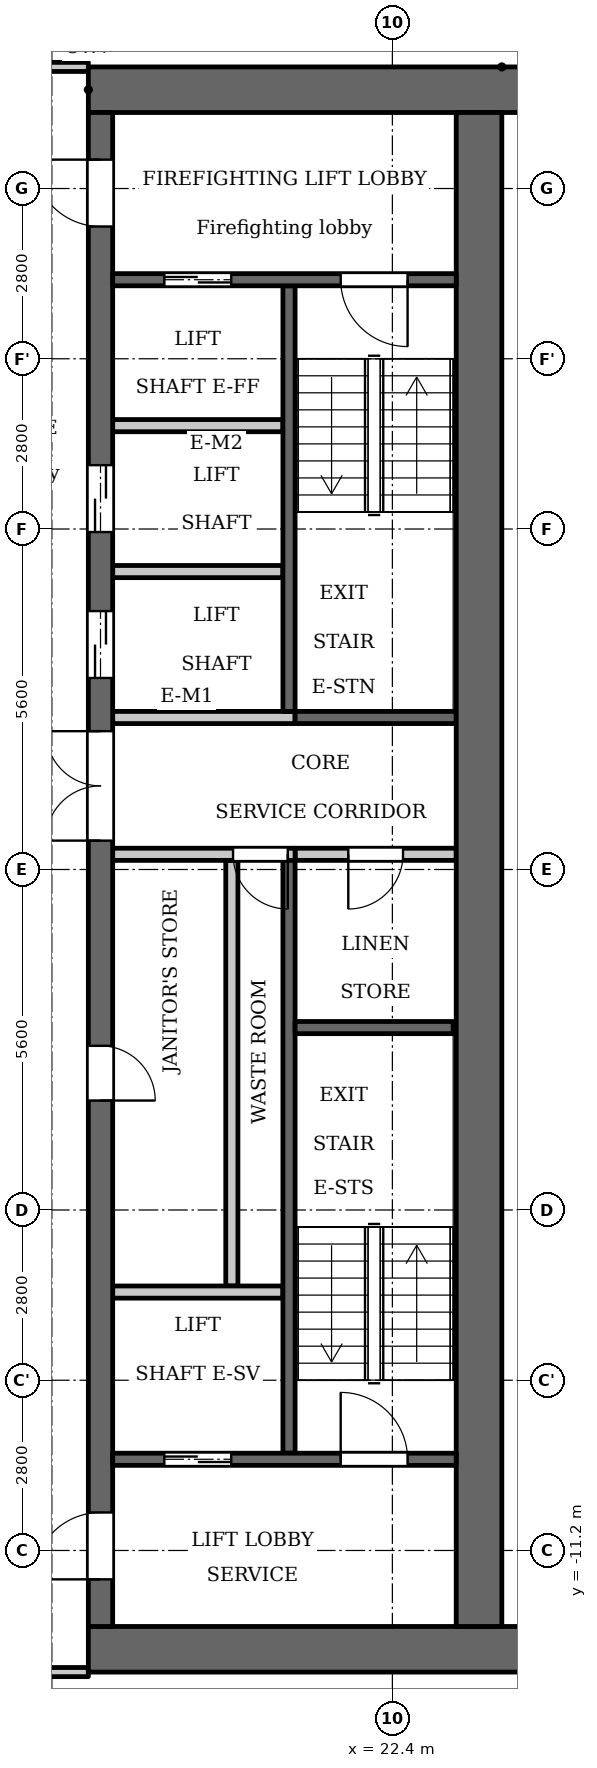
"""IFC4 building model, lengths in metres.
Left out: names, types, materials, properties, quantities, classifications, styles, units other than length and angle.
Written with IfcOpenShell. Run it as: python <this file> out.ifc"""

import sys

from ifc_helpers import new_model, si_unit, direction, frame, frame_2d, origin, place, context, subcontext, project, spatial, rectangle, extrude, element, fill, save


model = new_model("IFC4")
c1 = context("Model", 3, precision=1e-05, world=origin(), true_north=direction((0.0, 1.0)))
c2 = subcontext(c1, "Body", "Model", "MODEL_VIEW")
j1 = project(units=[si_unit("LENGTHUNIT", "METRE"), si_unit("PLANEANGLEUNIT", "RADIAN")], contexts=[c1])
p1 = place(None, origin())
s1 = spatial("IfcSite", under=j1, at=p1, CompositionType="ELEMENT")
p2 = place(p1, origin())
s2 = spatial("IfcBuilding", under=s1, at=p2, CompositionType="ELEMENT")
p3 = place(p2, frame((0.0, 0.0, 213.4)))
s3 = spatial("IfcBuildingStorey", under=s2, at=p3, CompositionType="ELEMENT", Elevation=213.4)
p4 = place(p3, frame((20.7, 2.6, 0.0), z_axis=(0.0, 0.0, 1.0), x_axis=(0.0, 1.0, 0.0)))
e1 = element("IfcWall", 1, at=p4, inside=s3, PredefinedType="SHEAR", context=c2, shape_type="SweptSolid", body=[
    extrude(rectangle(XDim=7.0, YDim=0.2, at=frame_2d((3.5, 0.0))), origin(), (0.0, 0.0, 1.0), 3.2),
])
p5 = place(p3, frame((20.7, -9.6, 0.0), z_axis=(0.0, 0.0, 1.0), x_axis=(0.0, 1.0, 0.0)))
e2 = element("IfcWall", 2, at=p5, inside=s3, PredefinedType="SHEAR", context=c2, shape_type="SweptSolid", body=[
    extrude(rectangle(XDim=9.75, YDim=0.2, at=frame_2d((4.875, 0.0))), origin(), (0.0, 0.0, 1.0), 3.2),
])
p6 = place(p3, frame((20.8, 2.5, 0.0), z_axis=(0.0, 0.0, 1.0), x_axis=(1.0, 0.0, 0.0)))
e3 = element("IfcWall", 3, at=p6, inside=s3, PredefinedType="SHEAR", context=c2, shape_type="SweptSolid", body=[
    extrude(rectangle(XDim=2.65, YDim=0.2, at=frame_2d((1.325, 0.0))), origin(), (0.0, 0.0, 1.0), 3.2),
])
p7 = place(p3, frame((20.8, 0.25, 0.0), z_axis=(0.0, 0.0, 1.0), x_axis=(1.0, 0.0, 0.0)))
e4 = element("IfcWall", 4, at=p7, inside=s3, PredefinedType="PARTITIONING", context=c2, shape_type="SweptSolid", body=[
    extrude(rectangle(XDim=2.65, YDim=0.2, at=frame_2d((1.325, 0.0))), origin(), (0.0, 0.0, 1.0), 3.2),
])
p8 = place(p7, frame((0.875, 0.0, 0.0)))
e5 = element("IfcOpeningElement", 5, at=p8, cuts=e4, PredefinedType="OPENING", context=c2, shape_type="SweptSolid", body=[
    extrude(rectangle(XDim=0.9, YDim=2.1, at=frame_2d((0.45, 1.05))), frame((0.0, 0.11, 0.0), z_axis=(0.0, -1.0, 0.0), x_axis=(1.0, 0.0, 0.0)), (0.0, 0.0, 1.0), 0.22),
])
for number, where, z_axis, x_axis in (
    (6, (17.4, 12.825, 0.0), (0.0, 0.0, 1.0), (1.0, 0.0, 0.0)),
    (7, (17.4, -12.825, 0.0), (0.0, 0.0, 1.0), (1.0, 0.0, 0.0)),
):
    element("IfcWall", number, at=place(p3, frame(where, z_axis=z_axis, x_axis=x_axis)), inside=s3, PredefinedType="SHEAR", context=c2, shape_type="SweptSolid", body=[
        extrude(rectangle(XDim=7.6, YDim=0.75, at=frame_2d((3.8, 0.0))), origin(), (0.0, 0.0, 1.0), 3.2),
    ])
p9 = place(p3, frame((19.76, -6.85, 0.0), z_axis=(0.0, 0.0, 1.0), x_axis=(0.0, 1.0, 0.0)))
e8 = element("IfcWall", 8, at=p9, inside=s3, PredefinedType="PARTITIONING", context=c2, shape_type="SweptSolid", body=[
    extrude(rectangle(XDim=7.0, YDim=0.2, at=frame_2d((3.5, 0.0))), origin(), (0.0, 0.0, 1.0), 3.2),
])
p10 = place(p3, frame((17.6, -12.45, 0.0), z_axis=(0.0, 0.0, 1.0), x_axis=(0.0, 1.0, 0.0)))
e9 = element("IfcWall", 9, at=p10, inside=s3, PredefinedType="SHEAR", context=c2, shape_type="SweptSolid", body=[
    extrude(rectangle(XDim=24.9, YDim=0.4, at=frame_2d((12.45, 0.0))), origin(), (0.0, 0.0, 1.0), 3.2),
])
p11 = place(p10, frame((8.65, 0.0, 0.0)))
e10 = element("IfcOpeningElement", 10, at=p11, cuts=e9, PredefinedType="OPENING", context=c2, shape_type="SweptSolid", body=[
    extrude(rectangle(XDim=0.9, YDim=2.1, at=frame_2d((0.45, 1.05))), frame((0.0, 0.21, 0.0), z_axis=(0.0, -1.0, 0.0), x_axis=(1.0, 0.0, 0.0)), (0.0, 0.0, 1.0), 0.42),
])
p12 = place(p10, frame((15.6, 0.0, 0.0)))
e11 = element("IfcOpeningElement", 11, at=p12, cuts=e9, PredefinedType="OPENING", context=c2, shape_type="SweptSolid", body=[
    extrude(rectangle(XDim=1.1, YDim=2.1, at=frame_2d((0.55, 1.05))), frame((0.0, 0.21, 0.0), z_axis=(0.0, -1.0, 0.0), x_axis=(1.0, 0.0, 0.0)), (0.0, 0.0, 1.0), 0.42),
])
p13 = place(p10, frame((18.0, 0.0, 0.0)))
e12 = element("IfcOpeningElement", 12, at=p13, cuts=e9, PredefinedType="OPENING", context=c2, shape_type="SweptSolid", body=[
    extrude(rectangle(XDim=1.1, YDim=2.1, at=frame_2d((0.55, 1.05))), frame((0.0, 0.21, 0.0), z_axis=(0.0, -1.0, 0.0), x_axis=(1.0, 0.0, 0.0)), (0.0, 0.0, 1.0), 0.42),
])
p14 = place(p10, frame((23.025, 0.0, 0.0)))
e13 = element("IfcOpeningElement", 13, at=p14, cuts=e9, PredefinedType="OPENING", context=c2, shape_type="SweptSolid", body=[
    extrude(rectangle(XDim=1.1, YDim=2.1, at=frame_2d((0.55, 1.05))), frame((0.0, 0.21, 0.0), z_axis=(0.0, -1.0, 0.0), x_axis=(1.0, 0.0, 0.0)), (0.0, 0.0, 1.0), 0.42),
])
p15 = place(p10, frame((0.775, 0.0, 0.0)))
e14 = element("IfcOpeningElement", 14, at=p15, cuts=e9, PredefinedType="OPENING", context=c2, shape_type="SweptSolid", body=[
    extrude(rectangle(XDim=1.1, YDim=2.1, at=frame_2d((0.55, 1.05))), frame((0.0, 0.21, 0.0), z_axis=(0.0, -1.0, 0.0), x_axis=(1.0, 0.0, 0.0)), (0.0, 0.0, 1.0), 0.42),
])
p16 = place(p10, frame((12.925, 0.0, 0.0)))
e15 = element("IfcOpeningElement", 15, at=p16, cuts=e9, PredefinedType="OPENING", context=c2, shape_type="SweptSolid", body=[
    extrude(rectangle(XDim=1.8, YDim=2.1, at=frame_2d((0.9, 1.05))), frame((0.0, 0.21, 0.0), z_axis=(0.0, -1.0, 0.0), x_axis=(1.0, 0.0, 0.0)), (0.0, 0.0, 1.0), 0.42),
])
p17 = place(p3, frame((23.825, -12.45, 0.0), z_axis=(0.0, 0.0, 1.0), x_axis=(0.0, 1.0, 0.0)))
e16 = element("IfcWall", 16, at=p17, inside=s3, PredefinedType="SHEAR", context=c2, shape_type="SweptSolid", body=[
    extrude(rectangle(XDim=24.9, YDim=0.75, at=frame_2d((12.45, 0.0))), origin(), (0.0, 0.0, 1.0), 3.2),
])
p18 = place(p3, frame((17.8, -9.7, 0.0), z_axis=(0.0, 0.0, 1.0), x_axis=(1.0, 0.0, 0.0)))
e17 = element("IfcWall", 17, at=p18, inside=s3, PredefinedType="SHEAR", context=c2, shape_type="SweptSolid", body=[
    extrude(rectangle(XDim=5.65, YDim=0.2, at=frame_2d((2.825, 0.0))), origin(), (0.0, 0.0, 1.0), 3.2),
])
p19 = place(p18, frame((0.85, 0.0, 0.0)))
e18 = element("IfcOpeningElement", 18, at=p19, cuts=e17, PredefinedType="OPENING", context=c2, shape_type="SweptSolid", body=[
    extrude(rectangle(XDim=1.1, YDim=2.1, at=frame_2d((0.55, 1.05))), frame((0.0, 0.11, 0.0), z_axis=(0.0, -1.0, 0.0), x_axis=(1.0, 0.0, 0.0)), (0.0, 0.0, 1.0), 0.22),
])
p20 = place(p18, frame((3.75, 0.0, 0.0)))
e19 = element("IfcOpeningElement", 19, at=p20, cuts=e17, PredefinedType="OPENING", context=c2, shape_type="SweptSolid", body=[
    extrude(rectangle(XDim=1.1, YDim=2.1, at=frame_2d((0.55, 1.05))), frame((0.0, 0.11, 0.0), z_axis=(0.0, -1.0, 0.0), x_axis=(1.0, 0.0, 0.0)), (0.0, 0.0, 1.0), 0.22),
])
p21 = place(p3, frame((17.8, -6.95, 0.0), z_axis=(0.0, 0.0, 1.0), x_axis=(1.0, 0.0, 0.0)))
e20 = element("IfcWall", 20, at=p21, inside=s3, PredefinedType="PARTITIONING", context=c2, shape_type="SweptSolid", body=[
    extrude(rectangle(XDim=2.8, YDim=0.2, at=frame_2d((1.4, 0.0))), origin(), (0.0, 0.0, 1.0), 3.2),
])
p22 = place(p3, frame((17.8, 0.25, 0.0), z_axis=(0.0, 0.0, 1.0), x_axis=(1.0, 0.0, 0.0)))
e21 = element("IfcWall", 21, at=p22, inside=s3, PredefinedType="PARTITIONING", context=c2, shape_type="SweptSolid", body=[
    extrude(rectangle(XDim=3.0, YDim=0.2, at=frame_2d((1.5, 0.0))), origin(), (0.0, 0.0, 1.0), 3.2),
])
p23 = place(p22, frame((1.98, 0.0, 0.0)))
e22 = element("IfcOpeningElement", 22, at=p23, cuts=e21, PredefinedType="OPENING", context=c2, shape_type="SweptSolid", body=[
    extrude(rectangle(XDim=0.9, YDim=2.1, at=frame_2d((0.45, 1.05))), frame((0.0, 0.11, 0.0), z_axis=(0.0, -1.0, 0.0), x_axis=(1.0, 0.0, 0.0)), (0.0, 0.0, 1.0), 0.22),
])
p24 = place(p3, frame((17.8, 2.5, 0.0), z_axis=(0.0, 0.0, 1.0), x_axis=(1.0, 0.0, 0.0)))
e23 = element("IfcWall", 23, at=p24, inside=s3, PredefinedType="PARTITIONING", context=c2, shape_type="SweptSolid", body=[
    extrude(rectangle(XDim=3.0, YDim=0.2, at=frame_2d((1.5, 0.0))), origin(), (0.0, 0.0, 1.0), 3.2),
])
for number, where, z_axis, x_axis in (
    (24, (17.8, 4.9, 0.0), (0.0, 0.0, 1.0), (1.0, 0.0, 0.0)),
    (25, (17.8, 7.3, 0.0), (0.0, 0.0, 1.0), (1.0, 0.0, 0.0)),
):
    element("IfcWall", number, at=place(p3, frame(where, z_axis=z_axis, x_axis=x_axis)), inside=s3, PredefinedType="PARTITIONING", context=c2, shape_type="SweptSolid", body=[
        extrude(rectangle(XDim=2.8, YDim=0.2, at=frame_2d((1.4, 0.0))), origin(), (0.0, 0.0, 1.0), 3.2),
    ])
p25 = place(p3, frame((17.8, 9.7, 0.0), z_axis=(0.0, 0.0, 1.0), x_axis=(1.0, 0.0, 0.0)))
e26 = element("IfcWall", 26, at=p25, inside=s3, PredefinedType="SHEAR", context=c2, shape_type="SweptSolid", body=[
    extrude(rectangle(XDim=5.65, YDim=0.2, at=frame_2d((2.825, 0.0))), origin(), (0.0, 0.0, 1.0), 3.2),
])
p26 = place(p25, frame((0.85, 0.0, 0.0)))
e27 = element("IfcOpeningElement", 27, at=p26, cuts=e26, PredefinedType="OPENING", context=c2, shape_type="SweptSolid", body=[
    extrude(rectangle(XDim=1.1, YDim=2.1, at=frame_2d((0.55, 1.05))), frame((0.0, 0.11, 0.0), z_axis=(0.0, -1.0, 0.0), x_axis=(1.0, 0.0, 0.0)), (0.0, 0.0, 1.0), 0.22),
])
p27 = place(p25, frame((3.75, 0.0, 0.0)))
e28 = element("IfcOpeningElement", 28, at=p27, cuts=e26, PredefinedType="OPENING", context=c2, shape_type="SweptSolid", body=[
    extrude(rectangle(XDim=1.1, YDim=2.1, at=frame_2d((0.55, 1.05))), frame((0.0, 0.11, 0.0), z_axis=(0.0, -1.0, 0.0), x_axis=(1.0, 0.0, 0.0)), (0.0, 0.0, 1.0), 0.22),
])
p28 = place(p3, frame((20.8, -2.6, 0.0), z_axis=(0.0, 0.0, 1.0), x_axis=(1.0, 0.0, 0.0)))
e29 = element("IfcWall", 29, at=p28, inside=s3, PredefinedType="SHEAR", context=c2, shape_type="SweptSolid", body=[
    extrude(rectangle(XDim=2.6, YDim=0.2, at=frame_2d((1.3, 0.0))), origin(), (0.0, 0.0, 1.0), 3.2),
])
p29 = place(p3, frame((-17.4, -13.2, 0.0), z_axis=(0.0, 0.0, 1.0), x_axis=(1.0, 0.0, 0.0)))
e30 = element("IfcWall", 30, at=p29, inside=s3, PredefinedType="PARTITIONING", context=c2, shape_type="SweptSolid", body=[
    extrude(rectangle(XDim=34.8, YDim=0.15, at=frame_2d((17.4, 0.0))), origin(), (0.0, 0.0, 1.0), 3.2),
])
p30 = place(p29, frame((0.65, 0.0, 0.0)))
e31 = element("IfcOpeningElement", 31, at=p30, cuts=e30, PredefinedType="OPENING", context=c2, shape_type="SweptSolid", body=[
    extrude(rectangle(XDim=1.0, YDim=2.1, at=frame_2d((0.5, 1.05))), frame((0.0, 0.085, 0.0), z_axis=(0.0, -1.0, 0.0), x_axis=(1.0, 0.0, 0.0)), (0.0, 0.0, 1.0), 0.17),
])
p31 = place(p29, frame((33.05, 0.0, 0.0)))
e32 = element("IfcOpeningElement", 32, at=p31, cuts=e30, PredefinedType="OPENING", context=c2, shape_type="SweptSolid", body=[
    extrude(rectangle(XDim=1.0, YDim=2.1, at=frame_2d((0.5, 1.05))), frame((0.0, 0.085, 0.0), z_axis=(0.0, -1.0, 0.0), x_axis=(1.0, 0.0, 0.0)), (0.0, 0.0, 1.0), 0.17),
])
p32 = place(p29, frame((4.55, 0.0, 0.0)))
e33 = element("IfcOpeningElement", 33, at=p32, cuts=e30, PredefinedType="OPENING", context=c2, shape_type="SweptSolid", body=[
    extrude(rectangle(XDim=1.0, YDim=2.1, at=frame_2d((0.5, 1.05))), frame((0.0, 0.085, 0.0), z_axis=(0.0, -1.0, 0.0), x_axis=(1.0, 0.0, 0.0)), (0.0, 0.0, 1.0), 0.17),
])
p33 = place(p29, frame((6.9, 0.0, 0.0)))
e34 = element("IfcOpeningElement", 34, at=p33, cuts=e30, PredefinedType="OPENING", context=c2, shape_type="SweptSolid", body=[
    extrude(rectangle(XDim=1.0, YDim=2.1, at=frame_2d((0.5, 1.05))), frame((0.0, 0.085, 0.0), z_axis=(0.0, -1.0, 0.0), x_axis=(1.0, 0.0, 0.0)), (0.0, 0.0, 1.0), 0.17),
])
p34 = place(p29, frame((15.75, 0.0, 0.0)))
e35 = element("IfcOpeningElement", 35, at=p34, cuts=e30, PredefinedType="OPENING", context=c2, shape_type="SweptSolid", body=[
    extrude(rectangle(XDim=1.0, YDim=2.1, at=frame_2d((0.5, 1.05))), frame((0.0, 0.085, 0.0), z_axis=(0.0, -1.0, 0.0), x_axis=(1.0, 0.0, 0.0)), (0.0, 0.0, 1.0), 0.17),
])
p35 = place(p29, frame((18.1, 0.0, 0.0)))
e36 = element("IfcOpeningElement", 36, at=p35, cuts=e30, PredefinedType="OPENING", context=c2, shape_type="SweptSolid", body=[
    extrude(rectangle(XDim=1.0, YDim=2.1, at=frame_2d((0.5, 1.05))), frame((0.0, 0.085, 0.0), z_axis=(0.0, -1.0, 0.0), x_axis=(1.0, 0.0, 0.0)), (0.0, 0.0, 1.0), 0.17),
])
p36 = place(p29, frame((26.95, 0.0, 0.0)))
e37 = element("IfcOpeningElement", 37, at=p36, cuts=e30, PredefinedType="OPENING", context=c2, shape_type="SweptSolid", body=[
    extrude(rectangle(XDim=1.0, YDim=2.1, at=frame_2d((0.5, 1.05))), frame((0.0, 0.085, 0.0), z_axis=(0.0, -1.0, 0.0), x_axis=(1.0, 0.0, 0.0)), (0.0, 0.0, 1.0), 0.17),
])
p37 = place(p29, frame((29.25, 0.0, 0.0)))
e38 = element("IfcOpeningElement", 38, at=p37, cuts=e30, PredefinedType="OPENING", context=c2, shape_type="SweptSolid", body=[
    extrude(rectangle(XDim=1.0, YDim=2.1, at=frame_2d((0.5, 1.05))), frame((0.0, 0.085, 0.0), z_axis=(0.0, -1.0, 0.0), x_axis=(1.0, 0.0, 0.0)), (0.0, 0.0, 1.0), 0.17),
])
p38 = place(p3, frame((-17.4, 13.2, 0.0), z_axis=(0.0, 0.0, 1.0), x_axis=(1.0, 0.0, 0.0)))
e39 = element("IfcWall", 39, at=p38, inside=s3, PredefinedType="PARTITIONING", context=c2, shape_type="SweptSolid", body=[
    extrude(rectangle(XDim=34.8, YDim=0.15, at=frame_2d((17.4, 0.0))), origin(), (0.0, 0.0, 1.0), 3.2),
])
p39 = place(p38, frame((0.75, 0.0, 0.0)))
e40 = element("IfcOpeningElement", 40, at=p39, cuts=e39, PredefinedType="OPENING", context=c2, shape_type="SweptSolid", body=[
    extrude(rectangle(XDim=1.0, YDim=2.1, at=frame_2d((0.5, 1.05))), frame((0.0, 0.085, 0.0), z_axis=(0.0, -1.0, 0.0), x_axis=(1.0, 0.0, 0.0)), (0.0, 0.0, 1.0), 0.17),
])
p40 = place(p38, frame((33.15, 0.0, 0.0)))
e41 = element("IfcOpeningElement", 41, at=p40, cuts=e39, PredefinedType="OPENING", context=c2, shape_type="SweptSolid", body=[
    extrude(rectangle(XDim=1.0, YDim=2.1, at=frame_2d((0.5, 1.05))), frame((0.0, 0.085, 0.0), z_axis=(0.0, -1.0, 0.0), x_axis=(1.0, 0.0, 0.0)), (0.0, 0.0, 1.0), 0.17),
])
p41 = place(p38, frame((12.45, 0.0, 0.0)))
e42 = element("IfcOpeningElement", 42, at=p41, cuts=e39, PredefinedType="OPENING", context=c2, shape_type="SweptSolid", body=[
    extrude(rectangle(XDim=1.0, YDim=2.1, at=frame_2d((0.5, 1.05))), frame((0.0, 0.085, 0.0), z_axis=(0.0, -1.0, 0.0), x_axis=(1.0, 0.0, 0.0)), (0.0, 0.0, 1.0), 0.17),
])
p42 = place(p38, frame((18.05, 0.0, 0.0)))
e43 = element("IfcOpeningElement", 43, at=p42, cuts=e39, PredefinedType="OPENING", context=c2, shape_type="SweptSolid", body=[
    extrude(rectangle(XDim=1.0, YDim=2.1, at=frame_2d((0.5, 1.05))), frame((0.0, 0.085, 0.0), z_axis=(0.0, -1.0, 0.0), x_axis=(1.0, 0.0, 0.0)), (0.0, 0.0, 1.0), 0.17),
])
p43 = place(p19, origin())
e44 = element("IfcDoor", 44, at=p43, inside=s3, OperationType="DOUBLE_DOOR_SLIDING", PredefinedType="DOOR", context=c2, shape_type="SweptSolid", body=[
    extrude(rectangle(XDim=1.1, YDim=2.1, at=frame_2d((0.55, 1.05))), frame((0.0, 0.025, 0.0), z_axis=(0.0, -1.0, 0.0), x_axis=(1.0, 0.0, 0.0)), (0.0, 0.0, 1.0), 0.05),
])
fill(e18, e44)
p44 = place(p11, origin())
e45 = element("IfcDoor", 45, at=p44, inside=s3, OperationType="SINGLE_SWING_LEFT", PredefinedType="DOOR", context=c2, shape_type="SweptSolid", body=[
    extrude(rectangle(XDim=0.9, YDim=2.1, at=frame_2d((0.45, 1.05))), frame((0.0, 0.025, 0.0), z_axis=(0.0, -1.0, 0.0), x_axis=(1.0, 0.0, 0.0)), (0.0, 0.0, 1.0), 0.05),
])
fill(e10, e45)
p45 = place(p23, origin())
e46 = element("IfcDoor", 46, at=p45, inside=s3, OperationType="SINGLE_SWING_RIGHT", PredefinedType="DOOR", context=c2, shape_type="SweptSolid", body=[
    extrude(rectangle(XDim=0.9, YDim=2.1, at=frame_2d((0.45, 1.05))), frame((0.0, 0.025, 0.0), z_axis=(0.0, -1.0, 0.0), x_axis=(1.0, 0.0, 0.0)), (0.0, 0.0, 1.0), 0.05),
])
fill(e22, e46)
p46 = place(p12, origin())
e47 = element("IfcDoor", 47, at=p46, inside=s3, OperationType="DOUBLE_DOOR_SLIDING", PredefinedType="DOOR", context=c2, shape_type="SweptSolid", body=[
    extrude(rectangle(XDim=1.1, YDim=2.1, at=frame_2d((0.55, 1.05))), frame((0.0, 0.025, 0.0), z_axis=(0.0, -1.0, 0.0), x_axis=(1.0, 0.0, 0.0)), (0.0, 0.0, 1.0), 0.05),
])
fill(e11, e47)
p47 = place(p13, origin())
e48 = element("IfcDoor", 48, at=p47, inside=s3, OperationType="DOUBLE_DOOR_SLIDING", PredefinedType="DOOR", context=c2, shape_type="SweptSolid", body=[
    extrude(rectangle(XDim=1.1, YDim=2.1, at=frame_2d((0.55, 1.05))), frame((0.0, 0.025, 0.0), z_axis=(0.0, -1.0, 0.0), x_axis=(1.0, 0.0, 0.0)), (0.0, 0.0, 1.0), 0.05),
])
fill(e12, e48)
p48 = place(p26, origin())
e49 = element("IfcDoor", 49, at=p48, inside=s3, OperationType="DOUBLE_DOOR_SLIDING", PredefinedType="DOOR", context=c2, shape_type="SweptSolid", body=[
    extrude(rectangle(XDim=1.1, YDim=2.1, at=frame_2d((0.55, 1.05))), frame((0.0, 0.025, 0.0), z_axis=(0.0, -1.0, 0.0), x_axis=(1.0, 0.0, 0.0)), (0.0, 0.0, 1.0), 0.05),
])
fill(e27, e49)
p49 = place(p14, origin())
e50 = element("IfcDoor", 50, at=p49, inside=s3, OperationType="SINGLE_SWING_LEFT", PredefinedType="DOOR", context=c2, shape_type="SweptSolid", body=[
    extrude(rectangle(XDim=1.1, YDim=2.1, at=frame_2d((0.55, 1.05))), frame((0.0, 0.025, 0.0), z_axis=(0.0, -1.0, 0.0), x_axis=(1.0, 0.0, 0.0)), (0.0, 0.0, 1.0), 0.05),
])
fill(e13, e50)
p50 = place(p15, origin())
e51 = element("IfcDoor", 51, at=p50, inside=s3, OperationType="SINGLE_SWING_RIGHT", PredefinedType="DOOR", context=c2, shape_type="SweptSolid", body=[
    extrude(rectangle(XDim=1.1, YDim=2.1, at=frame_2d((0.55, 1.05))), frame((0.0, 0.025, 0.0), z_axis=(0.0, -1.0, 0.0), x_axis=(1.0, 0.0, 0.0)), (0.0, 0.0, 1.0), 0.05),
])
fill(e14, e51)
p51 = place(p27, origin())
e52 = element("IfcDoor", 52, at=p51, inside=s3, OperationType="SINGLE_SWING_RIGHT", PredefinedType="DOOR", context=c2, shape_type="SweptSolid", body=[
    extrude(rectangle(XDim=1.1, YDim=2.1, at=frame_2d((0.55, 1.05))), frame((0.0, 0.025, 0.0), z_axis=(0.0, -1.0, 0.0), x_axis=(1.0, 0.0, 0.0)), (0.0, 0.0, 1.0), 0.05),
])
fill(e28, e52)
p52 = place(p20, origin())
e53 = element("IfcDoor", 53, at=p52, inside=s3, OperationType="SINGLE_SWING_RIGHT", PredefinedType="DOOR", context=c2, shape_type="SweptSolid", body=[
    extrude(rectangle(XDim=1.1, YDim=2.1, at=frame_2d((0.55, 1.05))), frame((0.0, 0.025, 0.0), z_axis=(0.0, -1.0, 0.0), x_axis=(1.0, 0.0, 0.0)), (0.0, 0.0, 1.0), 0.05),
])
fill(e19, e53)
p53 = place(p16, origin())
e54 = element("IfcDoor", 54, at=p53, inside=s3, OperationType="DOUBLE_DOOR_SINGLE_SWING", PredefinedType="DOOR", context=c2, shape_type="SweptSolid", body=[
    extrude(rectangle(XDim=1.8, YDim=2.1, at=frame_2d((0.9, 1.05))), frame((0.0, 0.025, 0.0), z_axis=(0.0, -1.0, 0.0), x_axis=(1.0, 0.0, 0.0)), (0.0, 0.0, 1.0), 0.05),
])
fill(e15, e54)
p54 = place(p8, origin())
e55 = element("IfcDoor", 55, at=p54, inside=s3, OperationType="SINGLE_SWING_LEFT", PredefinedType="DOOR", context=c2, shape_type="SweptSolid", body=[
    extrude(rectangle(XDim=0.9, YDim=2.1, at=frame_2d((0.45, 1.05))), frame((0.0, 0.025, 0.0), z_axis=(0.0, -1.0, 0.0), x_axis=(1.0, 0.0, 0.0)), (0.0, 0.0, 1.0), 0.05),
])
fill(e5, e55)
save(model, sys.argv[1])
